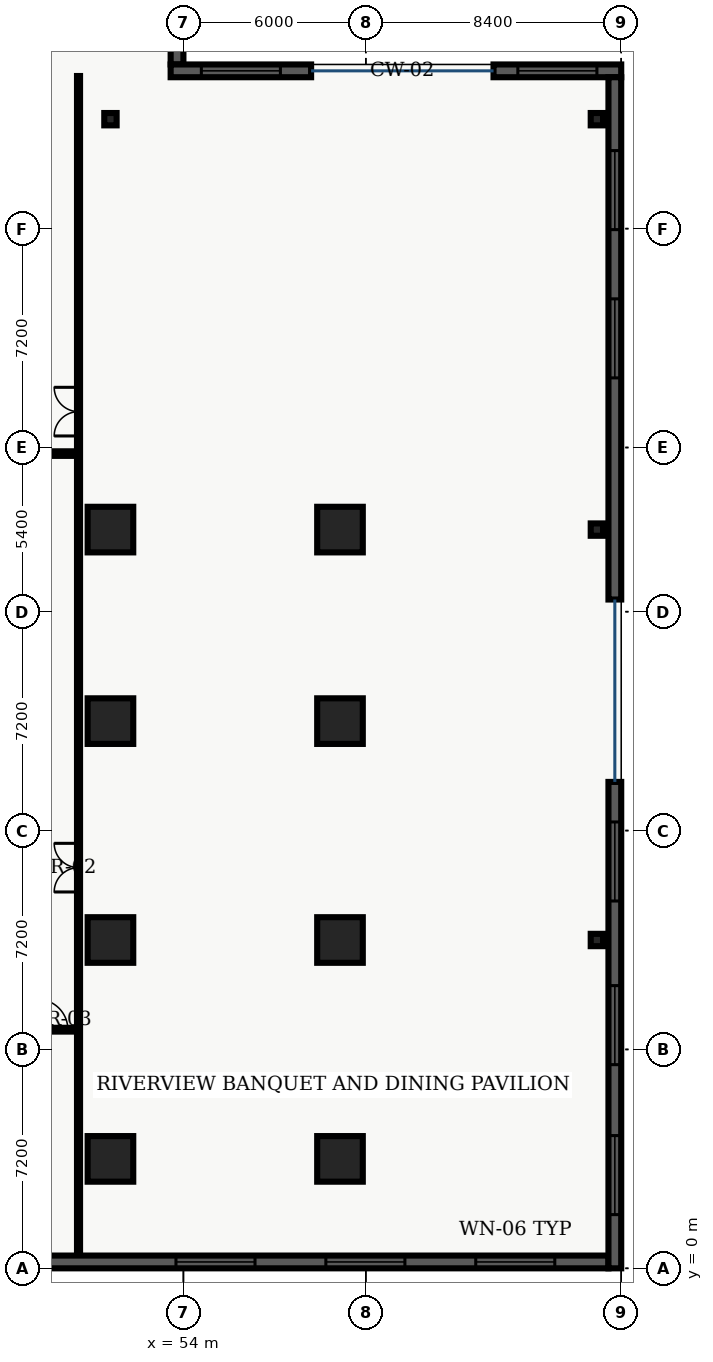
"""IFC4 building model, lengths in metres.
Left out: names, types, materials, properties, quantities, classifications, styles, units other than length and angle.
Written with IfcOpenShell. Run it as: python <this file> out.ifc"""

import sys

from ifc_helpers import new_model, entity, si_unit, converted_unit, direction, frame, origin_with_axes, origin_2d_with_axis, place, context, subcontext, project, spatial, polyline, rectangle, hollow_rectangle, outline, extrude, element, fill, save


model = new_model("IFC4")
c1 = context("Model", 3, precision=1e-05, world=origin_with_axes(), true_north=direction((0.0, 1.0)))
c2 = subcontext(c1, "Body", "Model", "MODEL_VIEW")
j1 = project(units=[si_unit("LENGTHUNIT", "METRE"), converted_unit("PLANEANGLEUNIT", "DEGREE", entity("IfcPlaneAngleMeasure", 0.017), si_unit("PLANEANGLEUNIT", "RADIAN"), dimensions=[0, 0, 0, 0, 0, 0, 0])], contexts=[c1])
p1 = place(None, origin_with_axes())
s1 = spatial("IfcSite", under=j1, at=p1, CompositionType="ELEMENT")
p2 = place(p1, origin_with_axes())
s2 = spatial("IfcBuilding", under=s1, at=p2, CompositionType="ELEMENT")
p3 = place(p2, frame((0.0, 0.0, 5.7), z_axis=(0.0, 0.0, 1.0), x_axis=(1.0, 0.0, 0.0)))
s3 = spatial("IfcBuildingStorey", under=s2, at=p3, CompositionType="ELEMENT", Elevation=5.7)
for number, where, z_axis, x_axis in (
    (1, (51.6, 3.6, 0.0), (0.0, 0.0, 1.0), (1.0, 0.0, 0.0)),
    (2, (51.6, 10.8, 0.0), (0.0, 0.0, 1.0), (1.0, 0.0, 0.0)),
    (3, (51.6, 18.0, 0.0), (0.0, 0.0, 1.0), (1.0, 0.0, 0.0)),
    (4, (51.6, 24.3, 0.0), (0.0, 0.0, 1.0), (1.0, 0.0, 0.0)),
    (5, (59.15, 3.6, 0.0), (0.0, 0.0, 1.0), (1.0, 0.0, 0.0)),
    (6, (59.15, 10.8, 0.0), (0.0, 0.0, 1.0), (1.0, 0.0, 0.0)),
    (7, (59.15, 18.0, 0.0), (0.0, 0.0, 1.0), (1.0, 0.0, 0.0)),
    (8, (59.15, 24.3, 0.0), (0.0, 0.0, 1.0), (1.0, 0.0, 0.0)),
):
    element("IfcColumn", number, at=place(p3, frame(where, z_axis=z_axis, x_axis=x_axis)), inside=s3, PredefinedType="COLUMN", context=c2, shape_type="SweptSolid", body=[
        extrude(rectangle(XDim=1.5, YDim=1.5, at=origin_2d_with_axis()), origin_with_axes(), (0.0, 0.0, 1.0), 5.1),
    ])
for number, where, z_axis, x_axis in (
    (9, (67.6, 10.8, 0.0), (0.0, 0.0, 1.0), (1.0, 0.0, 0.0)),
    (10, (67.6, 24.3, 0.0), (0.0, 0.0, 1.0), (1.0, 0.0, 0.0)),
    (11, (67.6, 37.8, 0.0), (0.0, 0.0, 1.0), (1.0, 0.0, 0.0)),
    (12, (51.6, 37.8, 0.0), (0.0, 0.0, 1.0), (1.0, 0.0, 0.0)),
):
    element("IfcColumn", number, at=place(p3, frame(where, z_axis=z_axis, x_axis=x_axis)), inside=s3, PredefinedType="COLUMN", context=c2, shape_type="SweptSolid", body=[
        extrude(hollow_rectangle(XDim=0.406, YDim=0.406, WallThickness=0.015, InnerFilletRadius=0.015, OuterFilletRadius=0.03, at=origin_2d_with_axis()), origin_with_axes(), (0.0, 0.0, 1.0), 5.1),
    ])
p4 = place(p3, frame((50.55, 0.38, 0.0), z_axis=(0.0, 0.0, 1.0), x_axis=(0.0, 1.0, 0.0)))
e13 = element("IfcWall", 13, at=p4, inside=s3, PredefinedType="PARTITIONING", context=c2, shape_type="SweptSolid", body=[
    extrude(outline(polyline([(0.0, -0.05), (38.84, -0.05), (38.84, 0.05), (0.0, 0.05), (0.0, -0.05)])), origin_with_axes(), (0.0, 0.0, 1.0), 3.2),
])
p5 = place(p4, frame((12.8, 0.0, 0.0), z_axis=(0.0, 0.0, 1.0), x_axis=(1.0, 0.0, 0.0)))
e14 = element("IfcOpeningElement", 14, at=p5, cuts=e13, PredefinedType="OPENING", context=c2, shape_type="SweptSolid", body=[
    extrude(rectangle(XDim=1.6, YDim=0.12, at=origin_2d_with_axis()), origin_with_axes(), (0.0, 0.0, 1.0), 2.2),
])
p6 = place(p4, frame((27.8, 0.0, 0.0), z_axis=(0.0, 0.0, 1.0), x_axis=(1.0, 0.0, 0.0)))
e15 = element("IfcOpeningElement", 15, at=p6, cuts=e13, PredefinedType="OPENING", context=c2, shape_type="SweptSolid", body=[
    extrude(rectangle(XDim=1.6, YDim=0.12, at=origin_2d_with_axis()), origin_with_axes(), (0.0, 0.0, 1.0), 2.2),
])
p7 = place(p3, frame((48.05, 7.85, 0.0), z_axis=(0.0, 0.0, 1.0), x_axis=(1.0, 0.0, 0.0)))
e16 = element("IfcWall", 16, at=p7, inside=s3, PredefinedType="PARTITIONING", context=c2, shape_type="SweptSolid", body=[
    extrude(outline(polyline([(0.0, -0.062), (2.5, -0.062), (2.5, 0.062), (0.0, 0.062), (0.0, -0.062)])), origin_with_axes(), (0.0, 0.0, 1.0), 3.2),
])
p8 = place(p7, frame((1.65, 0.0, 0.0), z_axis=(0.0, 0.0, 1.0), x_axis=(1.0, 0.0, 0.0)))
e17 = element("IfcOpeningElement", 17, at=p8, cuts=e16, PredefinedType="OPENING", context=c2, shape_type="SweptSolid", body=[
    extrude(rectangle(XDim=1.0, YDim=0.145, at=origin_2d_with_axis()), origin_with_axes(), (0.0, 0.0, 1.0), 2.15),
])
p9 = place(p3, frame((21.3, 26.8, 0.0), z_axis=(0.0, 0.0, 1.0), x_axis=(1.0, 0.0, 0.0)))
e18 = element("IfcWall", 18, at=p9, inside=s3, PredefinedType="PARTITIONING", context=c2, shape_type="SweptSolid", body=[
    extrude(outline(polyline([(0.0, -0.075), (29.25, -0.075), (29.25, 0.075), (0.0, 0.075), (0.0, -0.075)])), origin_with_axes(), (0.0, 0.0, 1.0), 3.2),
])
p10 = place(p3, frame((67.98, 0.21, 0.0), z_axis=(0.0, 0.0, 1.0), x_axis=(-1.0, 0.0, 0.0)))
e19 = element("IfcWall", 19, at=p10, inside=s3, PredefinedType="SOLIDWALL", context=c2, shape_type="SweptSolid", body=[
    extrude(outline(polyline([(0.0, -0.21), (30.78, -0.21), (30.78, 0.21), (0.0, 0.21), (0.0, -0.21)])), origin_with_axes(), (0.0, 0.0, 1.0), 4.86),
])
p11 = place(p10, frame((3.065, 0.0, 0.45), z_axis=(0.0, 0.0, 1.0), x_axis=(1.0, 0.0, 0.0)))
e20 = element("IfcOpeningElement", 20, at=p11, cuts=e19, PredefinedType="OPENING", context=c2, shape_type="SweptSolid", body=[
    extrude(rectangle(XDim=2.6, YDim=0.44, at=origin_2d_with_axis()), origin_with_axes(), (0.0, 0.0, 1.0), 2.8),
])
p12 = place(p10, frame((7.995, 0.0, 0.45), z_axis=(0.0, 0.0, 1.0), x_axis=(1.0, 0.0, 0.0)))
e21 = element("IfcOpeningElement", 21, at=p12, cuts=e19, PredefinedType="OPENING", context=c2, shape_type="SweptSolid", body=[
    extrude(rectangle(XDim=2.6, YDim=0.44, at=origin_2d_with_axis()), origin_with_axes(), (0.0, 0.0, 1.0), 2.8),
])
p13 = place(p10, frame((12.925, 0.0, 0.45), z_axis=(0.0, 0.0, 1.0), x_axis=(1.0, 0.0, 0.0)))
e22 = element("IfcOpeningElement", 22, at=p13, cuts=e19, PredefinedType="OPENING", context=c2, shape_type="SweptSolid", body=[
    extrude(rectangle(XDim=2.6, YDim=0.44, at=origin_2d_with_axis()), origin_with_axes(), (0.0, 0.0, 1.0), 2.8),
])
p14 = place(p10, frame((22.785, 0.0, 0.45), z_axis=(0.0, 0.0, 1.0), x_axis=(1.0, 0.0, 0.0)))
e23 = element("IfcOpeningElement", 23, at=p14, cuts=e19, PredefinedType="OPENING", context=c2, shape_type="SweptSolid", body=[
    extrude(rectangle(XDim=2.6, YDim=0.44, at=origin_2d_with_axis()), origin_with_axes(), (0.0, 0.0, 1.0), 2.8),
])
p15 = place(p10, frame((27.715, 0.0, 0.45), z_axis=(0.0, 0.0, 1.0), x_axis=(1.0, 0.0, 0.0)))
e24 = element("IfcOpeningElement", 24, at=p15, cuts=e19, PredefinedType="OPENING", context=c2, shape_type="SweptSolid", body=[
    extrude(rectangle(XDim=2.6, YDim=0.44, at=origin_2d_with_axis()), origin_with_axes(), (0.0, 0.0, 1.0), 2.8),
])
p16 = place(p3, frame((53.79, 41.55, 0.0), z_axis=(0.0, 0.0, 1.0), x_axis=(0.0, -1.0, 0.0)))
e25 = element("IfcWall", 25, at=p16, inside=s3, PredefinedType="SOLIDWALL", context=c2, shape_type="SweptSolid", body=[
    extrude(outline(polyline([(0.0, -0.21), (1.95, -0.21), (1.95, 0.21), (0.0, 0.21), (0.0, -0.21)])), origin_with_axes(), (0.0, 0.0, 1.0), 4.86),
])
p17 = place(p3, frame((53.58, 39.39, 0.0), z_axis=(0.0, 0.0, 1.0), x_axis=(1.0, 0.0, 0.0)))
e26 = element("IfcWall", 26, at=p17, inside=s3, PredefinedType="SOLIDWALL", context=c2, shape_type="SweptSolid", body=[
    extrude(outline(polyline([(0.0, -0.21), (4.62, -0.21), (4.62, 0.21), (0.0, 0.21), (0.0, -0.21)])), origin_with_axes(), (0.0, 0.0, 1.0), 4.86),
])
p18 = place(p17, frame((2.31, 0.0, 0.45), z_axis=(0.0, 0.0, 1.0), x_axis=(1.0, 0.0, 0.0)))
e27 = element("IfcOpeningElement", 27, at=p18, cuts=e26, PredefinedType="OPENING", context=c2, shape_type="SweptSolid", body=[
    extrude(rectangle(XDim=2.6, YDim=0.44, at=origin_2d_with_axis()), origin_with_axes(), (0.0, 0.0, 1.0), 2.8),
])
p19 = place(p3, frame((64.2, 39.39, 0.0), z_axis=(0.0, 0.0, 1.0), x_axis=(1.0, 0.0, 0.0)))
e28 = element("IfcWall", 28, at=p19, inside=s3, PredefinedType="SOLIDWALL", context=c2, shape_type="SweptSolid", body=[
    extrude(outline(polyline([(0.0, -0.21), (4.2, -0.21), (4.2, 0.21), (0.0, 0.21), (0.0, -0.21)])), origin_with_axes(), (0.0, 0.0, 1.0), 4.86),
])
p20 = place(p19, frame((2.1, 0.0, 0.45), z_axis=(0.0, 0.0, 1.0), x_axis=(1.0, 0.0, 0.0)))
e29 = element("IfcOpeningElement", 29, at=p20, cuts=e28, PredefinedType="OPENING", context=c2, shape_type="SweptSolid", body=[
    extrude(rectangle(XDim=2.6, YDim=0.44, at=origin_2d_with_axis()), origin_with_axes(), (0.0, 0.0, 1.0), 2.8),
])
p21 = place(p3, frame((68.19, 39.18, 0.0), z_axis=(0.0, 0.0, 1.0), x_axis=(0.0, -1.0, 0.0)))
e30 = element("IfcWall", 30, at=p21, inside=s3, PredefinedType="SOLIDWALL", context=c2, shape_type="SweptSolid", body=[
    extrude(outline(polyline([(0.0, -0.21), (17.18, -0.21), (17.18, 0.21), (0.0, 0.21), (0.0, -0.21)])), origin_with_axes(), (0.0, 0.0, 1.0), 4.86),
])
p22 = place(p21, frame((3.713, 0.0, 0.45), z_axis=(0.0, 0.0, 1.0), x_axis=(1.0, 0.0, 0.0)))
e31 = element("IfcOpeningElement", 31, at=p22, cuts=e30, PredefinedType="OPENING", context=c2, shape_type="SweptSolid", body=[
    extrude(rectangle(XDim=2.6, YDim=0.44, at=origin_2d_with_axis()), origin_with_axes(), (0.0, 0.0, 1.0), 2.8),
])
p23 = place(p21, frame((8.59, 0.0, 0.45), z_axis=(0.0, 0.0, 1.0), x_axis=(1.0, 0.0, 0.0)))
e32 = element("IfcOpeningElement", 32, at=p23, cuts=e30, PredefinedType="OPENING", context=c2, shape_type="SweptSolid", body=[
    extrude(rectangle(XDim=2.6, YDim=0.44, at=origin_2d_with_axis()), origin_with_axes(), (0.0, 0.0, 1.0), 2.8),
])
p24 = place(p3, frame((68.19, 16.0, 0.0), z_axis=(0.0, 0.0, 1.0), x_axis=(0.0, -1.0, 0.0)))
e33 = element("IfcWall", 33, at=p24, inside=s3, PredefinedType="SOLIDWALL", context=c2, shape_type="SweptSolid", body=[
    extrude(outline(polyline([(0.0, -0.21), (16.0, -0.21), (16.0, 0.21), (0.0, 0.21), (0.0, -0.21)])), origin_with_axes(), (0.0, 0.0, 1.0), 4.86),
])
p25 = place(p24, frame((2.617, 0.0, 0.45), z_axis=(0.0, 0.0, 1.0), x_axis=(1.0, 0.0, 0.0)))
e34 = element("IfcOpeningElement", 34, at=p25, cuts=e33, PredefinedType="OPENING", context=c2, shape_type="SweptSolid", body=[
    extrude(rectangle(XDim=2.6, YDim=0.44, at=origin_2d_with_axis()), origin_with_axes(), (0.0, 0.0, 1.0), 2.8),
])
p26 = place(p24, frame((8.0, 0.0, 0.45), z_axis=(0.0, 0.0, 1.0), x_axis=(1.0, 0.0, 0.0)))
e35 = element("IfcOpeningElement", 35, at=p26, cuts=e33, PredefinedType="OPENING", context=c2, shape_type="SweptSolid", body=[
    extrude(rectangle(XDim=2.6, YDim=0.44, at=origin_2d_with_axis()), origin_with_axes(), (0.0, 0.0, 1.0), 2.8),
])
p27 = place(p24, frame((12.933, 0.0, 0.45), z_axis=(0.0, 0.0, 1.0), x_axis=(1.0, 0.0, 0.0)))
e36 = element("IfcOpeningElement", 36, at=p27, cuts=e33, PredefinedType="OPENING", context=c2, shape_type="SweptSolid", body=[
    extrude(rectangle(XDim=2.6, YDim=0.44, at=origin_2d_with_axis()), origin_with_axes(), (0.0, 0.0, 1.0), 2.8),
])
p28 = place(p7, frame((1.65, 0.0, 0.0), z_axis=(0.0, 0.0, 1.0), x_axis=(1.0, 0.0, 0.0)))
e37 = element("IfcDoor", 37, at=p28, inside=s3, OperationType="SINGLE_SWING_LEFT", PredefinedType="DOOR", context=c2, shape_type="SweptSolid", body=[
    extrude(rectangle(XDim=1.0, YDim=0.075, at=origin_2d_with_axis()), origin_with_axes(), (0.0, 0.0, 1.0), 2.15),
])
fill(e17, e37)
p29 = place(p4, frame((12.8, 0.0, 0.0), z_axis=(0.0, 0.0, 1.0), x_axis=(1.0, 0.0, 0.0)))
e38 = element("IfcDoor", 38, at=p29, inside=s3, OperationType="DOUBLE_DOOR_SINGLE_SWING", PredefinedType="DOOR", context=c2, shape_type="SweptSolid", body=[
    extrude(rectangle(XDim=1.6, YDim=0.06, at=origin_2d_with_axis()), origin_with_axes(), (0.0, 0.0, 1.0), 2.2),
])
fill(e14, e38)
p30 = place(p4, frame((27.8, 0.0, 0.0), z_axis=(0.0, 0.0, 1.0), x_axis=(1.0, 0.0, 0.0)))
e39 = element("IfcDoor", 39, at=p30, inside=s3, OperationType="DOUBLE_DOOR_SINGLE_SWING", PredefinedType="DOOR", context=c2, shape_type="SweptSolid", body=[
    extrude(rectangle(XDim=1.6, YDim=0.06, at=origin_2d_with_axis()), origin_with_axes(), (0.0, 0.0, 1.0), 2.2),
])
fill(e15, e39)
p31 = place(p10, frame((3.065, 0.0, 0.45), z_axis=(0.0, 0.0, 1.0), x_axis=(1.0, 0.0, 0.0)))
e40 = element("IfcWindow", 40, at=p31, inside=s3, PredefinedType="WINDOW", context=c2, shape_type="SweptSolid", body=[
    extrude(rectangle(XDim=2.6, YDim=0.09, at=origin_2d_with_axis()), origin_with_axes(), (0.0, 0.0, 1.0), 2.8),
])
fill(e20, e40)
p32 = place(p10, frame((7.995, 0.0, 0.45), z_axis=(0.0, 0.0, 1.0), x_axis=(1.0, 0.0, 0.0)))
e41 = element("IfcWindow", 41, at=p32, inside=s3, PredefinedType="WINDOW", context=c2, shape_type="SweptSolid", body=[
    extrude(rectangle(XDim=2.6, YDim=0.09, at=origin_2d_with_axis()), origin_with_axes(), (0.0, 0.0, 1.0), 2.8),
])
fill(e21, e41)
p33 = place(p10, frame((12.925, 0.0, 0.45), z_axis=(0.0, 0.0, 1.0), x_axis=(1.0, 0.0, 0.0)))
e42 = element("IfcWindow", 42, at=p33, inside=s3, PredefinedType="WINDOW", context=c2, shape_type="SweptSolid", body=[
    extrude(rectangle(XDim=2.6, YDim=0.09, at=origin_2d_with_axis()), origin_with_axes(), (0.0, 0.0, 1.0), 2.8),
])
fill(e22, e42)
p34 = place(p17, frame((2.31, 0.0, 0.45), z_axis=(0.0, 0.0, 1.0), x_axis=(1.0, 0.0, 0.0)))
e43 = element("IfcWindow", 43, at=p34, inside=s3, PredefinedType="WINDOW", context=c2, shape_type="SweptSolid", body=[
    extrude(rectangle(XDim=2.6, YDim=0.09, at=origin_2d_with_axis()), origin_with_axes(), (0.0, 0.0, 1.0), 2.8),
])
fill(e27, e43)
p35 = place(p19, frame((2.1, 0.0, 0.45), z_axis=(0.0, 0.0, 1.0), x_axis=(1.0, 0.0, 0.0)))
e44 = element("IfcWindow", 44, at=p35, inside=s3, PredefinedType="WINDOW", context=c2, shape_type="SweptSolid", body=[
    extrude(rectangle(XDim=2.6, YDim=0.09, at=origin_2d_with_axis()), origin_with_axes(), (0.0, 0.0, 1.0), 2.8),
])
fill(e29, e44)
p36 = place(p21, frame((3.713, 0.0, 0.45), z_axis=(0.0, 0.0, 1.0), x_axis=(1.0, 0.0, 0.0)))
e45 = element("IfcWindow", 45, at=p36, inside=s3, PredefinedType="WINDOW", context=c2, shape_type="SweptSolid", body=[
    extrude(rectangle(XDim=2.6, YDim=0.09, at=origin_2d_with_axis()), origin_with_axes(), (0.0, 0.0, 1.0), 2.8),
])
fill(e31, e45)
p37 = place(p21, frame((8.59, 0.0, 0.45), z_axis=(0.0, 0.0, 1.0), x_axis=(1.0, 0.0, 0.0)))
e46 = element("IfcWindow", 46, at=p37, inside=s3, PredefinedType="WINDOW", context=c2, shape_type="SweptSolid", body=[
    extrude(rectangle(XDim=2.6, YDim=0.09, at=origin_2d_with_axis()), origin_with_axes(), (0.0, 0.0, 1.0), 2.8),
])
fill(e32, e46)
p38 = place(p24, frame((2.617, 0.0, 0.45), z_axis=(0.0, 0.0, 1.0), x_axis=(1.0, 0.0, 0.0)))
e47 = element("IfcWindow", 47, at=p38, inside=s3, PredefinedType="WINDOW", context=c2, shape_type="SweptSolid", body=[
    extrude(rectangle(XDim=2.6, YDim=0.09, at=origin_2d_with_axis()), origin_with_axes(), (0.0, 0.0, 1.0), 2.8),
])
fill(e34, e47)
p39 = place(p24, frame((8.0, 0.0, 0.45), z_axis=(0.0, 0.0, 1.0), x_axis=(1.0, 0.0, 0.0)))
e48 = element("IfcWindow", 48, at=p39, inside=s3, PredefinedType="WINDOW", context=c2, shape_type="SweptSolid", body=[
    extrude(rectangle(XDim=2.6, YDim=0.09, at=origin_2d_with_axis()), origin_with_axes(), (0.0, 0.0, 1.0), 2.8),
])
fill(e35, e48)
p40 = place(p24, frame((12.933, 0.0, 0.45), z_axis=(0.0, 0.0, 1.0), x_axis=(1.0, 0.0, 0.0)))
e49 = element("IfcWindow", 49, at=p40, inside=s3, PredefinedType="WINDOW", context=c2, shape_type="SweptSolid", body=[
    extrude(rectangle(XDim=2.6, YDim=0.09, at=origin_2d_with_axis()), origin_with_axes(), (0.0, 0.0, 1.0), 2.8),
])
fill(e36, e49)
save(model, sys.argv[1])
